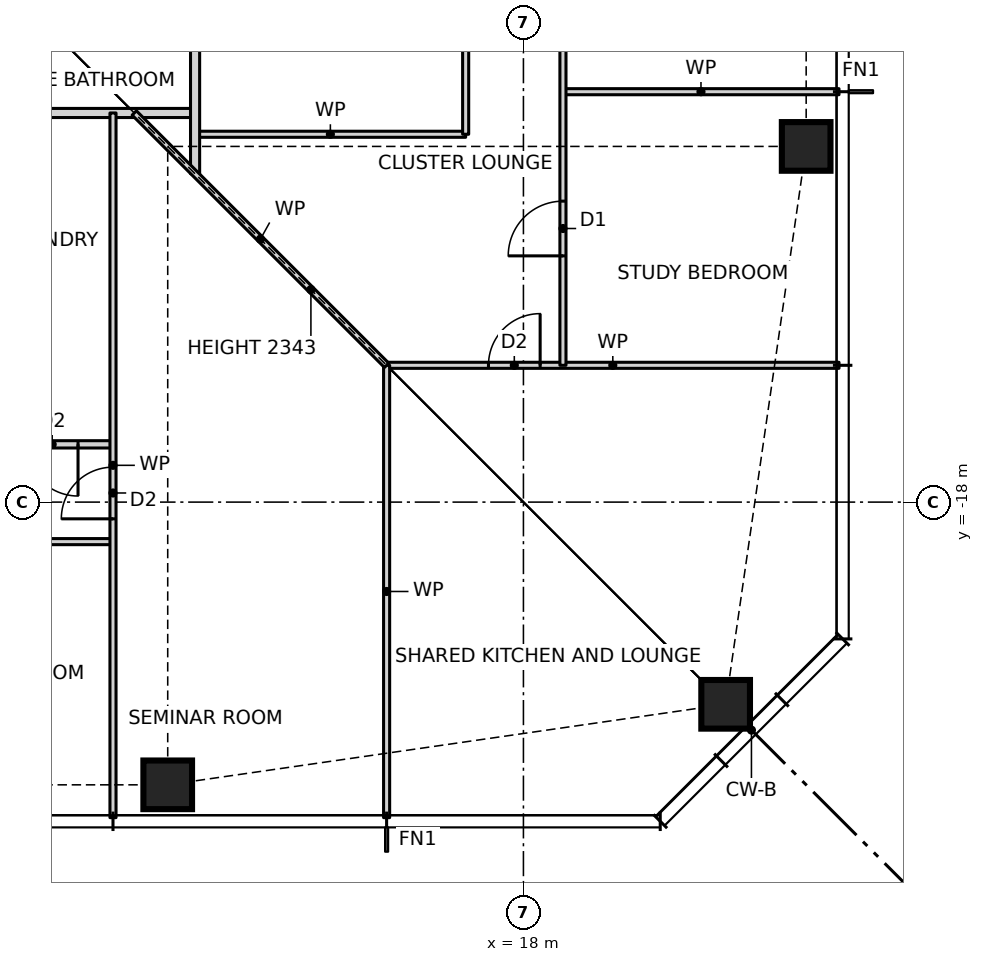
"""IFC4 building model, lengths in metres.
Left out: names, types, materials, properties, quantities, classifications, styles, units other than length and angle.
Written with IfcOpenShell. Run it as: python <this file> out.ifc"""

import sys

from ifc_helpers import new_model, si_unit, direction, frame, frame_2d, origin, origin_2d, place, context, subcontext, project, spatial, rectangle, hollow_rectangle, extrude, element, fill, save


model = new_model("IFC4")
c1 = context("Model", 3, precision=1e-05, world=origin(), true_north=direction((0.0, 1.0)))
c2 = subcontext(c1, "Body", "Model", "MODEL_VIEW")
j1 = project(units=[si_unit("LENGTHUNIT", "METRE"), si_unit("PLANEANGLEUNIT", "RADIAN")], contexts=[c1])
p1 = place(None, origin())
s1 = spatial("IfcSite", under=j1, at=p1, CompositionType="ELEMENT")
p2 = place(p1, origin())
s2 = spatial("IfcBuilding", under=s1, at=p2, CompositionType="ELEMENT")
p3 = place(p2, frame((0.0, 0.0, 32.5)))
s3 = spatial("IfcBuildingStorey", under=s2, at=p3, CompositionType="ELEMENT", Elevation=32.5)
for number, where, z_axis, x_axis in (
    (1, (12.15, -22.65, 0.0), (0.0, 0.0, 1.0), (1.0, 0.0, 0.0)),
    (2, (21.326, -21.326, 0.0), (0.0, 0.0, 1.0), (1.0, 0.0, 0.0)),
    (3, (22.65, -12.15, 0.0), (0.0, 0.0, 1.0), (1.0, 0.0, 0.0)),
):
    element("IfcColumn", number, at=place(p3, frame(where, z_axis=z_axis, x_axis=x_axis)), inside=s3, PredefinedType="COLUMN", context=c2, shape_type="SweptSolid", body=[
        extrude(hollow_rectangle(XDim=0.8, YDim=0.8, WallThickness=0.09, at=origin_2d()), origin(), (0.0, 0.0, 1.0), 3.5),
    ])
p4 = place(p3, frame((-15.75, -18.65, 0.0), z_axis=(0.0, 0.0, 1.0), x_axis=(1.0, 0.0, 0.0)))
e4 = element("IfcWall", 4, at=p4, inside=s3, PredefinedType="PARTITIONING", context=c2, shape_type="SweptSolid", body=[
    extrude(rectangle(XDim=27.0, YDim=0.1, at=frame_2d((13.5, 0.0))), origin(), (0.0, 0.0, 1.0), 3.27),
])
p5 = place(p4, frame((1.8, 0.0, 0.0)))
e5 = element("IfcOpeningElement", 5, at=p5, cuts=e4, PredefinedType="OPENING", context=c2, shape_type="SweptSolid", body=[
    extrude(rectangle(XDim=0.9, YDim=2.1, at=frame_2d((0.45, 1.05))), frame((0.0, 0.06, 0.0), z_axis=(0.0, -1.0, 0.0), x_axis=(1.0, 0.0, 0.0)), (0.0, 0.0, 1.0), 0.12),
])
p6 = place(p4, frame((6.3, 0.0, 0.0)))
e6 = element("IfcOpeningElement", 6, at=p6, cuts=e4, PredefinedType="OPENING", context=c2, shape_type="SweptSolid", body=[
    extrude(rectangle(XDim=0.9, YDim=2.1, at=frame_2d((0.45, 1.05))), frame((0.0, 0.06, 0.0), z_axis=(0.0, -1.0, 0.0), x_axis=(1.0, 0.0, 0.0)), (0.0, 0.0, 1.0), 0.12),
])
p7 = place(p4, frame((10.8, 0.0, 0.0)))
e7 = element("IfcOpeningElement", 7, at=p7, cuts=e4, PredefinedType="OPENING", context=c2, shape_type="SweptSolid", body=[
    extrude(rectangle(XDim=0.9, YDim=2.1, at=frame_2d((0.45, 1.05))), frame((0.0, 0.06, 0.0), z_axis=(0.0, -1.0, 0.0), x_axis=(1.0, 0.0, 0.0)), (0.0, 0.0, 1.0), 0.12),
])
p8 = place(p4, frame((15.3, 0.0, 0.0)))
e8 = element("IfcOpeningElement", 8, at=p8, cuts=e4, PredefinedType="OPENING", context=c2, shape_type="SweptSolid", body=[
    extrude(rectangle(XDim=0.9, YDim=2.1, at=frame_2d((0.45, 1.05))), frame((0.0, 0.06, 0.0), z_axis=(0.0, -1.0, 0.0), x_axis=(1.0, 0.0, 0.0)), (0.0, 0.0, 1.0), 0.12),
])
p9 = place(p4, frame((19.8, 0.0, 0.0)))
e9 = element("IfcOpeningElement", 9, at=p9, cuts=e4, PredefinedType="OPENING", context=c2, shape_type="SweptSolid", body=[
    extrude(rectangle(XDim=0.9, YDim=2.1, at=frame_2d((0.45, 1.05))), frame((0.0, 0.06, 0.0), z_axis=(0.0, -1.0, 0.0), x_axis=(1.0, 0.0, 0.0)), (0.0, 0.0, 1.0), 0.12),
])
p10 = place(p4, frame((24.3, 0.0, 0.0)))
e10 = element("IfcOpeningElement", 10, at=p10, cuts=e4, PredefinedType="OPENING", context=c2, shape_type="SweptSolid", body=[
    extrude(rectangle(XDim=0.9, YDim=2.1, at=frame_2d((0.45, 1.05))), frame((0.0, 0.06, 0.0), z_axis=(0.0, -1.0, 0.0), x_axis=(1.0, 0.0, 0.0)), (0.0, 0.0, 1.0), 0.12),
])
p11 = place(p3, frame((4.35, -17.05, 0.0), z_axis=(0.0, 0.0, 1.0), x_axis=(1.0, 0.0, 0.0)))
e11 = element("IfcWall", 11, at=p11, inside=s3, PredefinedType="PARTITIONING", context=c2, shape_type="SweptSolid", body=[
    extrude(rectangle(XDim=6.9, YDim=0.12, at=frame_2d((3.45, 0.0))), origin(), (0.0, 0.0, 1.0), 3.27),
])
p12 = place(p11, frame((2.125, 0.0, 0.0)))
e12 = element("IfcOpeningElement", 12, at=p12, cuts=e11, PredefinedType="OPENING", context=c2, shape_type="SweptSolid", body=[
    extrude(rectangle(XDim=0.85, YDim=2.1, at=frame_2d((0.425, 1.05))), frame((0.0, 0.07, 0.0), z_axis=(0.0, -1.0, 0.0), x_axis=(1.0, 0.0, 0.0)), (0.0, 0.0, 1.0), 0.14),
])
p13 = place(p11, frame((3.675, 0.0, 0.0)))
e13 = element("IfcOpeningElement", 13, at=p13, cuts=e11, PredefinedType="OPENING", context=c2, shape_type="SweptSolid", body=[
    extrude(rectangle(XDim=0.85, YDim=2.1, at=frame_2d((0.425, 1.05))), frame((0.0, 0.07, 0.0), z_axis=(0.0, -1.0, 0.0), x_axis=(1.0, 0.0, 0.0)), (0.0, 0.0, 1.0), 0.14),
])
p14 = place(p11, frame((5.475, 0.0, 0.0)))
e14 = element("IfcOpeningElement", 14, at=p14, cuts=e11, PredefinedType="OPENING", context=c2, shape_type="SweptSolid", body=[
    extrude(rectangle(XDim=0.85, YDim=2.1, at=frame_2d((0.425, 1.05))), frame((0.0, 0.07, 0.0), z_axis=(0.0, -1.0, 0.0), x_axis=(1.0, 0.0, 0.0)), (0.0, 0.0, 1.0), 0.14),
])
p15 = place(p3, frame((15.75, -15.75, 0.0), z_axis=(0.0, 0.0, 1.0), x_axis=(1.0, 0.0, 0.0)))
e15 = element("IfcWall", 15, at=p15, inside=s3, PredefinedType="PARTITIONING", context=c2, shape_type="SweptSolid", body=[
    extrude(rectangle(XDim=7.44, YDim=0.1, at=frame_2d((3.72, 0.0))), origin(), (0.0, 0.0, 1.0), 3.27),
])
p16 = place(p15, frame((1.675, 0.0, 0.0)))
e16 = element("IfcOpeningElement", 16, at=p16, cuts=e15, PredefinedType="OPENING", context=c2, shape_type="SweptSolid", body=[
    extrude(rectangle(XDim=0.85, YDim=2.1, at=frame_2d((0.425, 1.05))), frame((0.0, 0.06, 0.0), z_axis=(0.0, -1.0, 0.0), x_axis=(1.0, 0.0, 0.0)), (0.0, 0.0, 1.0), 0.12),
])
p17 = place(p3, frame((12.6, -11.95, 0.0), z_axis=(0.0, 0.0, 1.0), x_axis=(1.0, 0.0, 0.0)))
e17 = element("IfcWall", 17, at=p17, inside=s3, PredefinedType="PARTITIONING", context=c2, shape_type="SweptSolid", body=[
    extrude(rectangle(XDim=4.45, YDim=0.1, at=frame_2d((2.225, 0.0))), origin(), (0.0, 0.0, 1.0), 3.27),
])
p18 = place(p3, frame((-11.6, -11.6, 0.0), z_axis=(0.0, 0.0, 1.0), x_axis=(1.0, 0.0, 0.0)))
e18 = element("IfcWall", 18, at=p18, inside=s3, PredefinedType="PARTITIONING", context=c2, shape_type="SweptSolid", body=[
    extrude(rectangle(XDim=24.2, YDim=0.15, at=frame_2d((12.1, 0.0))), origin(), (0.0, 0.0, 1.0), 3.27),
])
p19 = place(p18, frame((14.25, 0.0, 0.0)))
e19 = element("IfcOpeningElement", 19, at=p19, cuts=e18, PredefinedType="OPENING", context=c2, shape_type="SweptSolid", body=[
    extrude(rectangle(XDim=1.0, YDim=2.1, at=frame_2d((0.5, 1.05))), frame((0.0, 0.085, 0.0), z_axis=(0.0, -1.0, 0.0), x_axis=(1.0, 0.0, 0.0)), (0.0, 0.0, 1.0), 0.17),
])
p20 = place(p18, frame((16.4, 0.0, 0.0)))
e20 = element("IfcOpeningElement", 20, at=p20, cuts=e18, PredefinedType="OPENING", context=c2, shape_type="SweptSolid", body=[
    extrude(rectangle(XDim=0.9, YDim=2.1, at=frame_2d((0.45, 1.05))), frame((0.0, 0.085, 0.0), z_axis=(0.0, -1.0, 0.0), x_axis=(1.0, 0.0, 0.0)), (0.0, 0.0, 1.0), 0.17),
])
p21 = place(p3, frame((18.65, -11.25, 0.0), z_axis=(0.0, 0.0, 1.0), x_axis=(1.0, 0.0, 0.0)))
e21 = element("IfcWall", 21, at=p21, inside=s3, PredefinedType="PARTITIONING", context=c2, shape_type="SweptSolid", body=[
    extrude(rectangle(XDim=4.54, YDim=0.1, at=frame_2d((2.27, 0.0))), origin(), (0.0, 0.0, 1.0), 3.27),
])
p22 = place(p3, frame((18.65, -15.75, 0.0), z_axis=(0.0, 0.0, 1.0), x_axis=(0.0, 1.0, 0.0)))
e22 = element("IfcWall", 22, at=p22, inside=s3, PredefinedType="PARTITIONING", context=c2, shape_type="SweptSolid", body=[
    extrude(rectangle(XDim=31.5, YDim=0.1, at=frame_2d((15.75, 0.0))), origin(), (0.0, 0.0, 1.0), 3.27),
])
p23 = place(p22, frame((1.8, 0.0, 0.0)))
e23 = element("IfcOpeningElement", 23, at=p23, cuts=e22, PredefinedType="OPENING", context=c2, shape_type="SweptSolid", body=[
    extrude(rectangle(XDim=0.9, YDim=2.1, at=frame_2d((0.45, 1.05))), frame((0.0, 0.06, 0.0), z_axis=(0.0, -1.0, 0.0), x_axis=(1.0, 0.0, 0.0)), (0.0, 0.0, 1.0), 0.12),
])
p24 = place(p22, frame((6.3, 0.0, 0.0)))
e24 = element("IfcOpeningElement", 24, at=p24, cuts=e22, PredefinedType="OPENING", context=c2, shape_type="SweptSolid", body=[
    extrude(rectangle(XDim=0.9, YDim=2.1, at=frame_2d((0.45, 1.05))), frame((0.0, 0.06, 0.0), z_axis=(0.0, -1.0, 0.0), x_axis=(1.0, 0.0, 0.0)), (0.0, 0.0, 1.0), 0.12),
])
p25 = place(p22, frame((10.8, 0.0, 0.0)))
e25 = element("IfcOpeningElement", 25, at=p25, cuts=e22, PredefinedType="OPENING", context=c2, shape_type="SweptSolid", body=[
    extrude(rectangle(XDim=0.9, YDim=2.1, at=frame_2d((0.45, 1.05))), frame((0.0, 0.06, 0.0), z_axis=(0.0, -1.0, 0.0), x_axis=(1.0, 0.0, 0.0)), (0.0, 0.0, 1.0), 0.12),
])
p26 = place(p22, frame((15.3, 0.0, 0.0)))
e26 = element("IfcOpeningElement", 26, at=p26, cuts=e22, PredefinedType="OPENING", context=c2, shape_type="SweptSolid", body=[
    extrude(rectangle(XDim=0.9, YDim=2.1, at=frame_2d((0.45, 1.05))), frame((0.0, 0.06, 0.0), z_axis=(0.0, -1.0, 0.0), x_axis=(1.0, 0.0, 0.0)), (0.0, 0.0, 1.0), 0.12),
])
p27 = place(p22, frame((19.8, 0.0, 0.0)))
e27 = element("IfcOpeningElement", 27, at=p27, cuts=e22, PredefinedType="OPENING", context=c2, shape_type="SweptSolid", body=[
    extrude(rectangle(XDim=0.9, YDim=2.1, at=frame_2d((0.45, 1.05))), frame((0.0, 0.06, 0.0), z_axis=(0.0, -1.0, 0.0), x_axis=(1.0, 0.0, 0.0)), (0.0, 0.0, 1.0), 0.12),
])
p28 = place(p22, frame((24.3, 0.0, 0.0)))
e28 = element("IfcOpeningElement", 28, at=p28, cuts=e22, PredefinedType="OPENING", context=c2, shape_type="SweptSolid", body=[
    extrude(rectangle(XDim=0.9, YDim=2.1, at=frame_2d((0.45, 1.05))), frame((0.0, 0.06, 0.0), z_axis=(0.0, -1.0, 0.0), x_axis=(1.0, 0.0, 0.0)), (0.0, 0.0, 1.0), 0.12),
])
p29 = place(p22, frame((28.8, 0.0, 0.0)))
e29 = element("IfcOpeningElement", 29, at=p29, cuts=e22, PredefinedType="OPENING", context=c2, shape_type="SweptSolid", body=[
    extrude(rectangle(XDim=0.9, YDim=2.1, at=frame_2d((0.45, 1.05))), frame((0.0, 0.06, 0.0), z_axis=(0.0, -1.0, 0.0), x_axis=(1.0, 0.0, 0.0)), (0.0, 0.0, 1.0), 0.12),
])
p30 = place(p3, frame((17.05, -11.95, 0.0), z_axis=(0.0, 0.0, 1.0), x_axis=(0.0, 1.0, 0.0)))
e30 = element("IfcWall", 30, at=p30, inside=s3, PredefinedType="PARTITIONING", context=c2, shape_type="SweptSolid", body=[
    extrude(rectangle(XDim=20.2, YDim=0.1, at=frame_2d((10.1, 0.0))), origin(), (0.0, 0.0, 1.0), 3.27),
])
p31 = place(p30, frame((9.675, 0.0, 0.0)))
e31 = element("IfcOpeningElement", 31, at=p31, cuts=e30, PredefinedType="OPENING", context=c2, shape_type="SweptSolid", body=[
    extrude(rectangle(XDim=0.85, YDim=2.1, at=frame_2d((0.425, 1.05))), frame((0.0, 0.06, 0.0), z_axis=(0.0, -1.0, 0.0), x_axis=(1.0, 0.0, 0.0)), (0.0, 0.0, 1.0), 0.12),
])
p32 = place(p3, frame((15.75, -23.19, 0.0), z_axis=(0.0, 0.0, 1.0), x_axis=(0.0, 1.0, 0.0)))
e32 = element("IfcWall", 32, at=p32, inside=s3, PredefinedType="PARTITIONING", context=c2, shape_type="SweptSolid", body=[
    extrude(rectangle(XDim=7.44, YDim=0.1, at=frame_2d((3.72, 0.0))), origin(), (0.0, 0.0, 1.0), 3.27),
])
p33 = place(p3, frame((12.6, -12.6, 0.0), z_axis=(0.0, 0.0, 1.0), x_axis=(0.0, 1.0, 0.0)))
e33 = element("IfcWall", 33, at=p33, inside=s3, PredefinedType="PARTITIONING", context=c2, shape_type="SweptSolid", body=[
    extrude(rectangle(XDim=25.2, YDim=0.15, at=frame_2d((12.6, 0.0))), origin(), (0.0, 0.0, 1.0), 3.27),
])
p34 = place(p33, frame((21.55, 0.0, 0.0)))
e34 = element("IfcOpeningElement", 34, at=p34, cuts=e33, PredefinedType="OPENING", context=c2, shape_type="SweptSolid", body=[
    extrude(rectangle(XDim=1.0, YDim=2.1, at=frame_2d((0.5, 1.05))), frame((0.0, 0.085, 0.0), z_axis=(0.0, -1.0, 0.0), x_axis=(1.0, 0.0, 0.0)), (0.0, 0.0, 1.0), 0.17),
])
p35 = place(p3, frame((11.25, -23.19, 0.0), z_axis=(0.0, 0.0, 1.0), x_axis=(0.0, 1.0, 0.0)))
e35 = element("IfcWall", 35, at=p35, inside=s3, PredefinedType="PARTITIONING", context=c2, shape_type="SweptSolid", body=[
    extrude(rectangle(XDim=11.59, YDim=0.1, at=frame_2d((5.795, 0.0))), origin(), (0.0, 0.0, 1.0), 3.27),
])
p36 = place(p35, frame((4.915, 0.0, 0.0)))
e36 = element("IfcOpeningElement", 36, at=p36, cuts=e35, PredefinedType="OPENING", context=c2, shape_type="SweptSolid", body=[
    extrude(rectangle(XDim=0.85, YDim=2.1, at=frame_2d((0.425, 1.05))), frame((0.0, 0.06, 0.0), z_axis=(0.0, -1.0, 0.0), x_axis=(1.0, 0.0, 0.0)), (0.0, 0.0, 1.0), 0.12),
])
p37 = place(p3, frame((15.75, -15.75, 0.0), z_axis=(0.0, 0.0, 1.0), x_axis=(-0.707106781187, 0.707106781187, 0.0)))
e37 = element("IfcWall", 37, at=p37, inside=s3, PredefinedType="PARTITIONING", context=c2, shape_type="SweptSolid", body=[
    extrude(rectangle(XDim=5.869, YDim=0.1, at=frame_2d((2.935, 0.0))), origin(), (0.0, 0.0, 1.0), 2.343),
])
p38 = place(p14, frame((0.85, 0.0, 0.0), z_axis=(0.0, 0.0, 1.0), x_axis=(-1.0, 0.0, 0.0)))
e38 = element("IfcDoor", 38, at=p38, inside=s3, OperationType="SINGLE_SWING_LEFT", PredefinedType="DOOR", context=c2, shape_type="SweptSolid", body=[
    extrude(rectangle(XDim=0.85, YDim=2.1, at=frame_2d((0.425, 1.05))), frame((0.0, 0.025, 0.0), z_axis=(0.0, -1.0, 0.0), x_axis=(1.0, 0.0, 0.0)), (0.0, 0.0, 1.0), 0.05),
])
fill(e14, e38)
p39 = place(p36, origin())
e39 = element("IfcDoor", 39, at=p39, inside=s3, OperationType="SINGLE_SWING_LEFT", PredefinedType="DOOR", context=c2, shape_type="SweptSolid", body=[
    extrude(rectangle(XDim=0.85, YDim=2.1, at=frame_2d((0.425, 1.05))), frame((0.0, 0.025, 0.0), z_axis=(0.0, -1.0, 0.0), x_axis=(1.0, 0.0, 0.0)), (0.0, 0.0, 1.0), 0.05),
])
fill(e36, e39)
p40 = place(p23, origin())
e40 = element("IfcDoor", 40, at=p40, inside=s3, OperationType="SINGLE_SWING_LEFT", PredefinedType="DOOR", context=c2, shape_type="SweptSolid", body=[
    extrude(rectangle(XDim=0.9, YDim=2.1, at=frame_2d((0.45, 1.05))), frame((0.0, 0.025, 0.0), z_axis=(0.0, -1.0, 0.0), x_axis=(1.0, 0.0, 0.0)), (0.0, 0.0, 1.0), 0.05),
])
fill(e23, e40)
p41 = place(p16, origin())
e41 = element("IfcDoor", 41, at=p41, inside=s3, OperationType="SINGLE_SWING_RIGHT", PredefinedType="DOOR", context=c2, shape_type="SweptSolid", body=[
    extrude(rectangle(XDim=0.85, YDim=2.1, at=frame_2d((0.425, 1.05))), frame((0.0, 0.025, 0.0), z_axis=(0.0, -1.0, 0.0), x_axis=(1.0, 0.0, 0.0)), (0.0, 0.0, 1.0), 0.05),
])
fill(e16, e41)
save(model, sys.argv[1])
